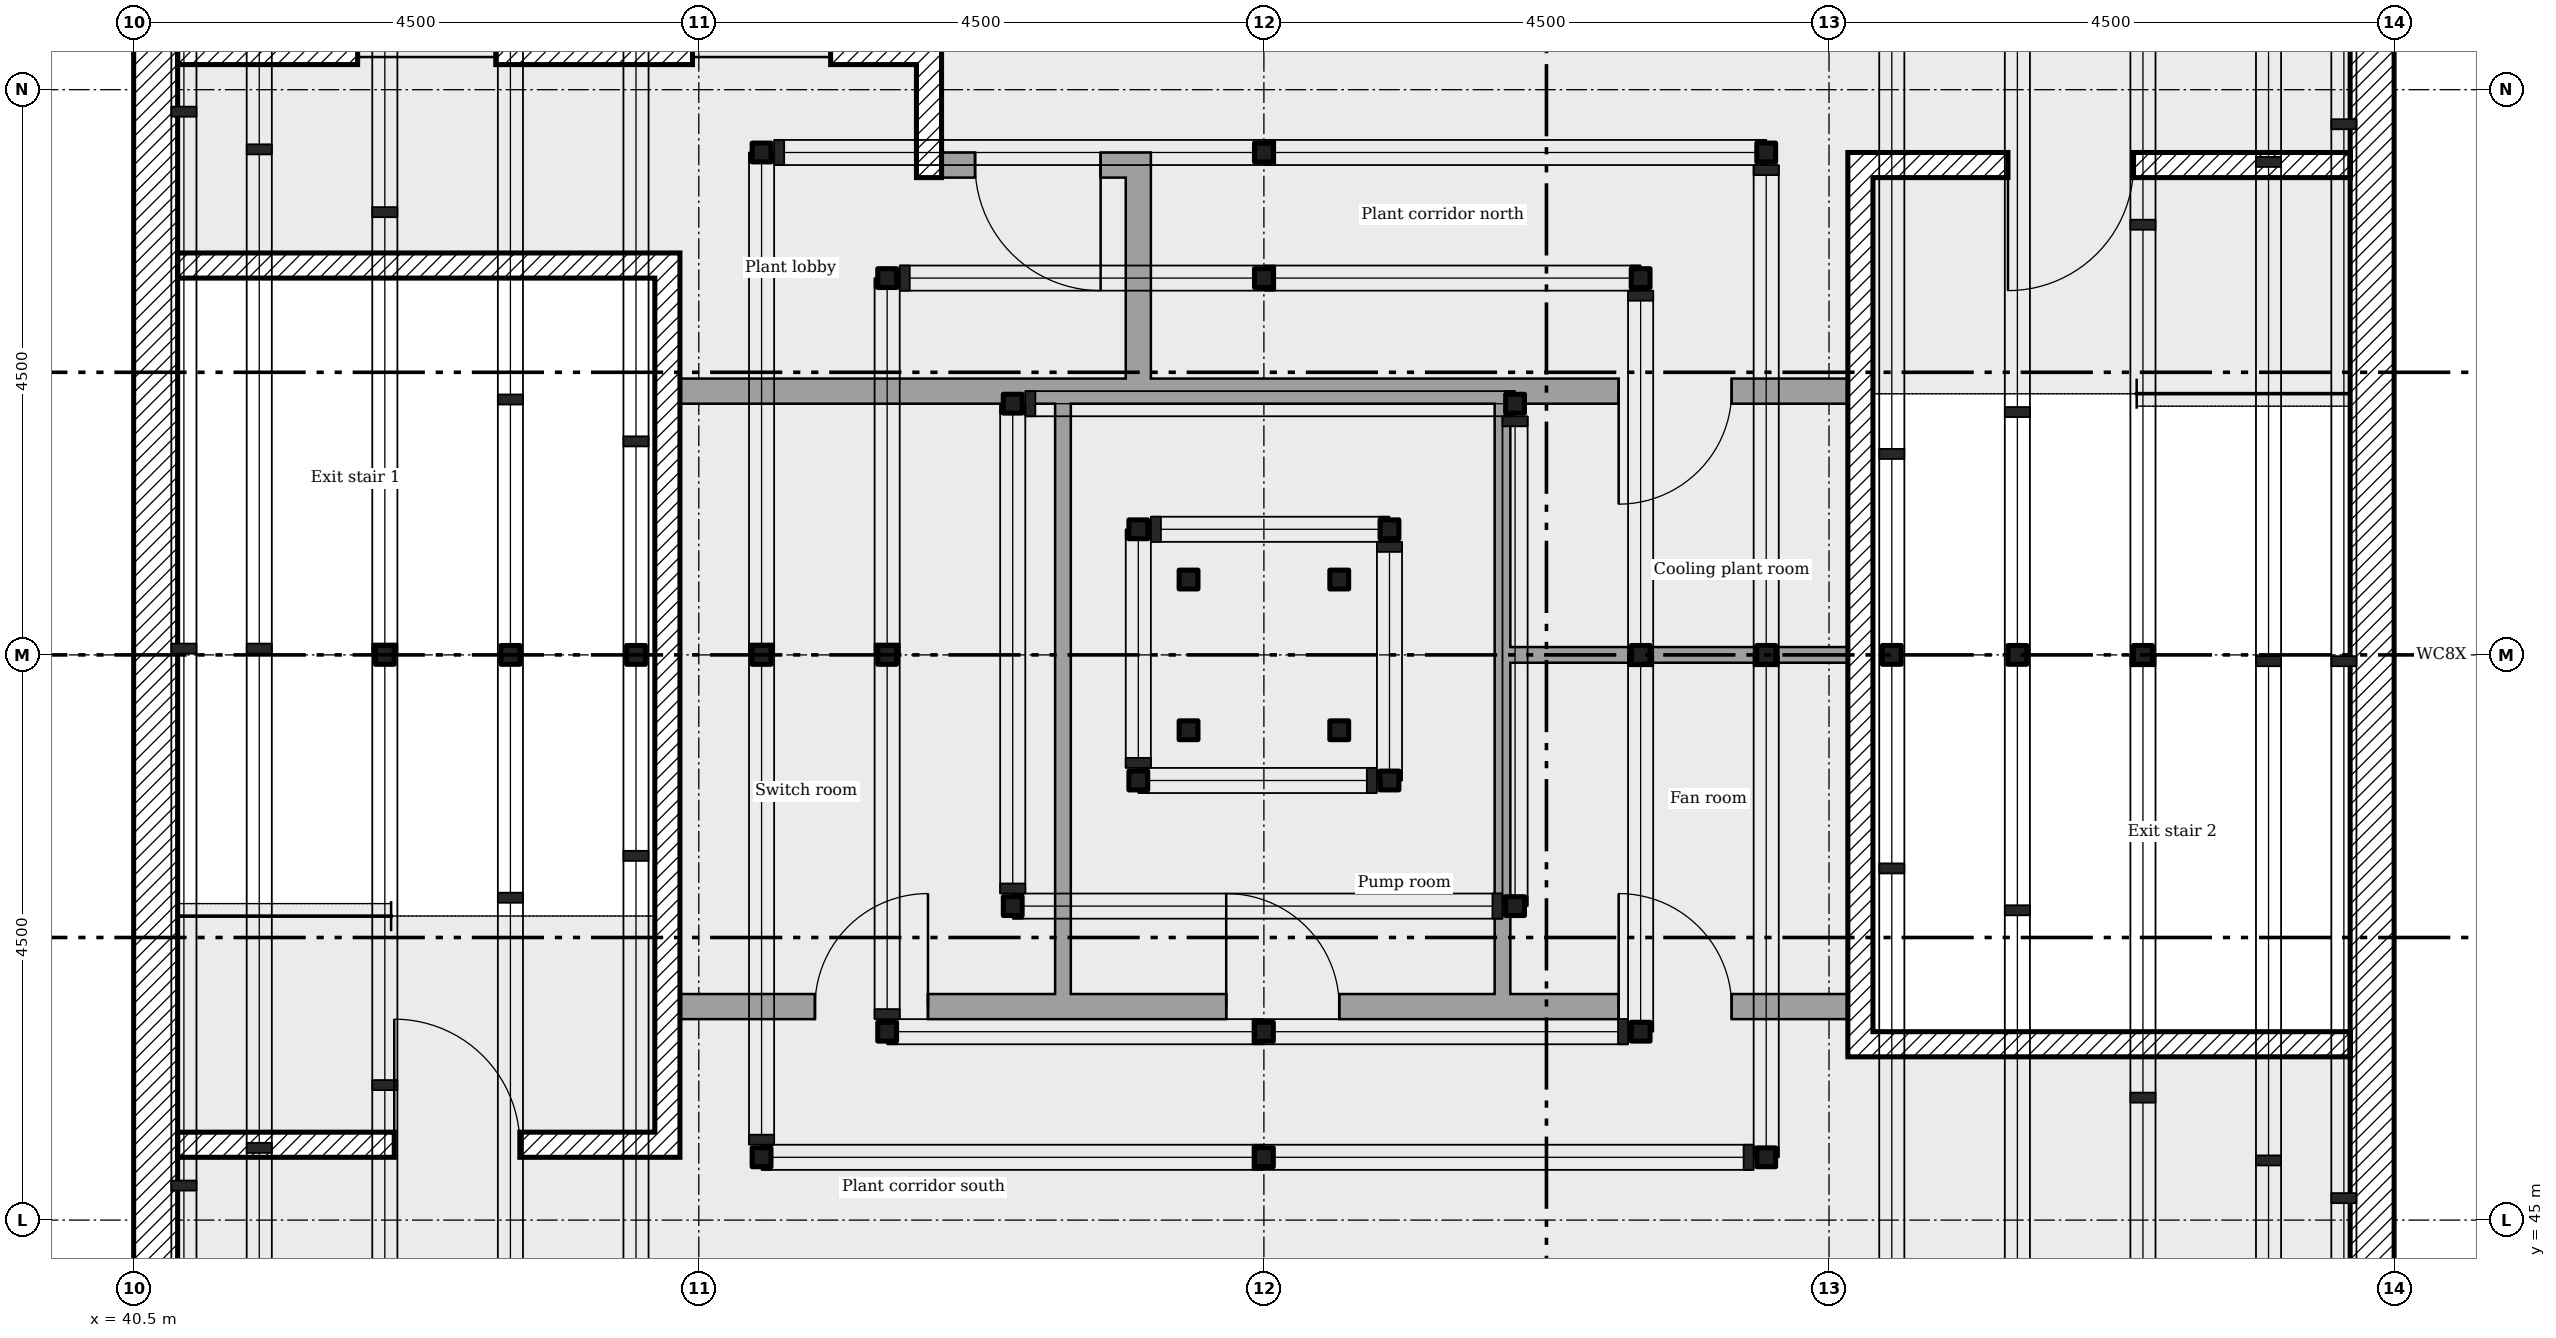
"""IFC4 building model, lengths in metres.
Left out: names, types, materials, properties, quantities, classifications, styles, units other than length and angle.
Written with IfcOpenShell. Run it as: python <this file> out.ifc"""

import sys

from ifc_helpers import new_model, si_unit, direction, frame, frame_2d, origin, origin_2d, place, context, subcontext, project, spatial, rectangle, hollow_rectangle, extrude, element, fill, save


model = new_model("IFC4")
c1 = context("Model", 3, precision=1e-05, world=origin(), true_north=direction((0.0, 1.0)))
c2 = subcontext(c1, "Body", "Model", "MODEL_VIEW")
j1 = project(units=[si_unit("LENGTHUNIT", "METRE"), si_unit("PLANEANGLEUNIT", "RADIAN")], contexts=[c1])
p1 = place(None, origin())
s1 = spatial("IfcSite", under=j1, at=p1, CompositionType="ELEMENT")
p2 = place(p1, origin())
s2 = spatial("IfcBuilding", under=s1, at=p2, CompositionType="ELEMENT")
p3 = place(p2, frame((0.0, 0.0, 279.1)))
s3 = spatial("IfcBuildingStorey", under=s2, at=p3, CompositionType="ELEMENT", Elevation=279.1)
p4 = place(p3, frame((58.375, 40.75, 4.5), z_axis=(0.0, 0.0, 1.0), x_axis=(0.0, 1.0, 0.0)))
e1 = element("IfcWall", 1, at=p4, inside=s3, PredefinedType="PARAPET", context=c2, shape_type="SweptSolid", body=[
    extrude(rectangle(XDim=17.75, YDim=0.25, at=frame_2d((8.875, 0.0))), origin(), (0.0, 0.0, 1.0), 1.1),
])
p5 = place(p3, frame((40.625, 58.25, 4.5), z_axis=(0.0, 0.0, 1.0), x_axis=(0.0, -1.0, 0.0)))
e2 = element("IfcWall", 2, at=p5, inside=s3, PredefinedType="PARAPET", context=c2, shape_type="SweptSolid", body=[
    extrude(rectangle(XDim=17.5, YDim=0.25, at=frame_2d((8.75, 0.0))), origin(), (0.0, 0.0, 1.0), 1.1),
])
for number, where in (
    (3, (56.5, 49.5, 4.5)),
    (4, (42.5, 49.5, 4.5)),
):
    element("IfcColumn", number, at=place(p3, frame(where)), inside=s3, PredefinedType="COLUMN", context=c2, shape_type="SweptSolid", body=[
        extrude(hollow_rectangle(XDim=0.15, YDim=0.15, WallThickness=0.008, at=origin_2d()), origin(), (0.0, 0.0, 1.0), 1.8),
    ])
for number, where in (
    (5, (55.5, 49.5, 4.5)),
    (6, (43.5, 49.5, 4.5)),
):
    element("IfcColumn", number, at=place(p3, frame(where)), inside=s3, PredefinedType="COLUMN", context=c2, shape_type="SweptSolid", body=[
        extrude(hollow_rectangle(XDim=0.15, YDim=0.15, WallThickness=0.008, at=origin_2d()), origin(), (0.0, 0.0, 1.0), 3.95),
    ])
for number, where in (
    (7, (54.5, 49.5, 4.5)),
    (8, (44.5, 49.5, 4.5)),
):
    element("IfcColumn", number, at=place(p3, frame(where)), inside=s3, PredefinedType="COLUMN", context=c2, shape_type="SweptSolid", body=[
        extrude(hollow_rectangle(XDim=0.15, YDim=0.15, WallThickness=0.008, at=origin_2d()), origin(), (0.0, 0.0, 1.0), 6.1),
    ])
for number, where in (
    (9, (45.5, 45.5, 4.5)),
    (10, (49.5, 45.5, 4.5)),
    (11, (53.5, 45.5, 4.5)),
    (12, (53.5, 49.5, 4.5)),
    (13, (53.5, 53.5, 4.5)),
    (14, (49.5, 53.5, 4.5)),
    (15, (45.5, 53.5, 4.5)),
    (16, (45.5, 49.5, 4.5)),
):
    element("IfcColumn", number, at=place(p3, frame(where)), inside=s3, PredefinedType="COLUMN", context=c2, shape_type="SweptSolid", body=[
        extrude(hollow_rectangle(XDim=0.15, YDim=0.15, WallThickness=0.008, at=origin_2d()), origin(), (0.0, 0.0, 1.0), 8.29),
    ])
for number, where in (
    (17, (46.5, 46.5, 4.5)),
    (18, (49.5, 46.5, 4.5)),
    (19, (52.5, 46.5, 4.5)),
    (20, (52.5, 49.5, 4.5)),
    (21, (52.5, 52.5, 4.5)),
    (22, (49.5, 52.5, 4.5)),
    (23, (46.5, 52.5, 4.5)),
    (24, (46.5, 49.5, 4.5)),
):
    element("IfcColumn", number, at=place(p3, frame(where)), inside=s3, PredefinedType="COLUMN", context=c2, shape_type="SweptSolid", body=[
        extrude(hollow_rectangle(XDim=0.15, YDim=0.15, WallThickness=0.008, at=origin_2d()), origin(), (0.0, 0.0, 1.0), 10.48),
    ])
for number, where in (
    (25, (47.5, 47.5, 4.5)),
    (26, (51.5, 47.5, 4.5)),
    (27, (51.5, 51.5, 4.5)),
    (28, (47.5, 51.5, 4.5)),
):
    element("IfcColumn", number, at=place(p3, frame(where)), inside=s3, PredefinedType="COLUMN", context=c2, shape_type="SweptSolid", body=[
        extrude(hollow_rectangle(XDim=0.15, YDim=0.15, WallThickness=0.008, at=origin_2d()), origin(), (0.0, 0.0, 1.0), 12.59),
    ])
for number, where in (
    (29, (48.5, 48.5, 4.5)),
    (30, (50.5, 48.5, 4.5)),
    (31, (50.5, 50.5, 4.5)),
    (32, (48.5, 50.5, 4.5)),
):
    element("IfcColumn", number, at=place(p3, frame(where)), inside=s3, PredefinedType="COLUMN", context=c2, shape_type="SweptSolid", body=[
        extrude(hollow_rectangle(XDim=0.15, YDim=0.15, WallThickness=0.008, at=origin_2d()), origin(), (0.0, 0.0, 1.0), 14.78),
    ])
for number, where in (
    (33, (48.9, 48.9, 4.5)),
    (34, (50.1, 48.9, 4.5)),
    (35, (50.1, 50.1, 4.5)),
    (36, (48.9, 50.1, 4.5)),
):
    element("IfcColumn", number, at=place(p3, frame(where)), inside=s3, PredefinedType="COLUMN", context=c2, shape_type="SweptSolid", body=[
        extrude(hollow_rectangle(XDim=0.15, YDim=0.15, WallThickness=0.008, at=origin_2d()), origin(), (0.0, 0.0, 1.0), 16.93),
    ])
p6 = place(p3, frame((58.325, 40.5, 0.0), z_axis=(0.0, 0.0, 1.0), x_axis=(0.0, 1.0, 0.0)))
e37 = element("IfcWall", 37, at=p6, inside=s3, PredefinedType="SHEAR", context=c2, shape_type="SweptSolid", body=[
    extrude(rectangle(XDim=18.0, YDim=0.35, at=frame_2d((9.0, 0.0))), origin(), (0.0, 0.0, 1.0), 3.3),
])
p7 = place(p3, frame((40.675, 40.85, 0.0), z_axis=(0.0, 0.0, 1.0), x_axis=(0.0, 1.0, 0.0)))
e38 = element("IfcWall", 38, at=p7, inside=s3, PredefinedType="SHEAR", context=c2, shape_type="SweptSolid", body=[
    extrude(rectangle(XDim=17.3, YDim=0.35, at=frame_2d((8.65, 0.0))), origin(), (0.0, 0.0, 1.0), 3.3),
])
p8 = place(p3, frame((46.833, 58.15, 0.0), z_axis=(0.0, 0.0, 1.0), x_axis=(0.0, -1.0, 0.0)))
e39 = element("IfcWall", 39, at=p8, inside=s3, PredefinedType="SHEAR", context=c2, shape_type="SweptSolid", body=[
    extrude(rectangle(XDim=4.85, YDim=0.2, at=frame_2d((2.425, 0.0))), origin(), (0.0, 0.0, 1.0), 3.3),
])
p9 = place(p3, frame((48.5, 51.6, 0.0), z_axis=(0.0, 0.0, 1.0), x_axis=(0.0, 1.0, 0.0)))
e40 = element("IfcWall", 40, at=p9, inside=s3, PredefinedType="PARTITIONING", context=c2, shape_type="SweptSolid", body=[
    extrude(rectangle(XDim=1.9, YDim=0.2, at=frame_2d((0.95, 0.0))), origin(), (0.0, 0.0, 1.0), 3.3),
])
p10 = place(p3, frame((46.933, 53.4, 0.0)))
e41 = element("IfcWall", 41, at=p10, inside=s3, PredefinedType="PARTITIONING", context=c2, shape_type="SweptSolid", body=[
    extrude(rectangle(XDim=1.467, YDim=0.2, at=frame_2d((0.733, 0.0))), origin(), (0.0, 0.0, 1.0), 3.3),
])
p11 = place(p10, frame((0.267, 0.0, 0.0)))
e42 = element("IfcOpeningElement", 42, at=p11, cuts=e41, PredefinedType="OPENING", context=c2, shape_type="SweptSolid", body=[
    extrude(rectangle(XDim=1.0, YDim=2.1, at=frame_2d((0.5, 1.05))), frame((0.0, 0.11, 0.0), z_axis=(0.0, -1.0, 0.0), x_axis=(1.0, 0.0, 0.0)), (0.0, 0.0, 1.0), 0.22),
])
p12 = place(p3, frame((40.85, 54.3, 0.0)))
e43 = element("IfcWall", 43, at=p12, inside=s3, PredefinedType="SHEAR", context=c2, shape_type="SweptSolid", body=[
    extrude(rectangle(XDim=5.883, YDim=0.2, at=frame_2d((2.942, 0.0))), origin(), (0.0, 0.0, 1.0), 3.3),
])
p13 = place(p12, frame((1.433, 0.0, 0.0)))
e44 = element("IfcOpeningElement", 44, at=p13, cuts=e43, PredefinedType="OPENING", context=c2, shape_type="SweptSolid", body=[
    extrude(rectangle(XDim=1.1, YDim=2.1, at=frame_2d((0.55, 1.05))), frame((0.0, 0.11, 0.0), z_axis=(0.0, -1.0, 0.0), x_axis=(1.0, 0.0, 0.0)), (0.0, 0.0, 1.0), 0.22),
])
p14 = place(p12, frame((4.1, 0.0, 0.0)))
e45 = element("IfcOpeningElement", 45, at=p14, cuts=e43, PredefinedType="OPENING", context=c2, shape_type="SweptSolid", body=[
    extrude(rectangle(XDim=1.1, YDim=2.1, at=frame_2d((0.55, 1.05))), frame((0.0, 0.11, 0.0), z_axis=(0.0, -1.0, 0.0), x_axis=(1.0, 0.0, 0.0)), (0.0, 0.0, 1.0), 0.22),
])
p15 = place(p3, frame((44.75, 45.5, 0.0), z_axis=(0.0, 0.0, 1.0), x_axis=(0.0, 1.0, 0.0)))
e46 = element("IfcWall", 46, at=p15, inside=s3, PredefinedType="SHEAR", context=c2, shape_type="SweptSolid", body=[
    extrude(rectangle(XDim=7.2, YDim=0.2, at=frame_2d((3.6, 0.0))), origin(), (0.0, 0.0, 1.0), 3.3),
])
p16 = place(p3, frame((40.85, 52.6, 0.0)))
e47 = element("IfcWall", 47, at=p16, inside=s3, PredefinedType="SHEAR", context=c2, shape_type="SweptSolid", body=[
    extrude(rectangle(XDim=3.8, YDim=0.2, at=frame_2d((1.9, 0.0))), origin(), (0.0, 0.0, 1.0), 3.3),
])
p17 = place(p3, frame((40.85, 45.6, 0.0)))
e48 = element("IfcWall", 48, at=p17, inside=s3, PredefinedType="SHEAR", context=c2, shape_type="SweptSolid", body=[
    extrude(rectangle(XDim=3.8, YDim=0.2, at=frame_2d((1.9, 0.0))), origin(), (0.0, 0.0, 1.0), 3.3),
])
p18 = place(p17, frame((1.725, 0.0, 0.0)))
e49 = element("IfcOpeningElement", 49, at=p18, cuts=e48, PredefinedType="OPENING", context=c2, shape_type="SweptSolid", body=[
    extrude(rectangle(XDim=1.0, YDim=2.1, at=frame_2d((0.5, 1.05))), frame((0.0, 0.11, 0.0), z_axis=(0.0, -1.0, 0.0), x_axis=(1.0, 0.0, 0.0)), (0.0, 0.0, 1.0), 0.22),
])
p19 = place(p3, frame((54.15, 53.4, 0.0)))
e50 = element("IfcWall", 50, at=p19, inside=s3, PredefinedType="SHEAR", context=c2, shape_type="SweptSolid", body=[
    extrude(rectangle(XDim=4.0, YDim=0.2, at=frame_2d((2.0, 0.0))), origin(), (0.0, 0.0, 1.0), 3.3),
])
p20 = place(p19, frame((1.275, 0.0, 0.0)))
e51 = element("IfcOpeningElement", 51, at=p20, cuts=e50, PredefinedType="OPENING", context=c2, shape_type="SweptSolid", body=[
    extrude(rectangle(XDim=1.0, YDim=2.1, at=frame_2d((0.5, 1.05))), frame((0.0, 0.11, 0.0), z_axis=(0.0, -1.0, 0.0), x_axis=(1.0, 0.0, 0.0)), (0.0, 0.0, 1.0), 0.22),
])
p21 = place(p3, frame((54.15, 46.4, 0.0)))
e52 = element("IfcWall", 52, at=p21, inside=s3, PredefinedType="SHEAR", context=c2, shape_type="SweptSolid", body=[
    extrude(rectangle(XDim=4.0, YDim=0.2, at=frame_2d((2.0, 0.0))), origin(), (0.0, 0.0, 1.0), 3.3),
])
p22 = place(p3, frame((54.25, 46.5, 0.0), z_axis=(0.0, 0.0, 1.0), x_axis=(0.0, 1.0, 0.0)))
e53 = element("IfcWall", 53, at=p22, inside=s3, PredefinedType="SHEAR", context=c2, shape_type="SweptSolid", body=[
    extrude(rectangle(XDim=6.8, YDim=0.2, at=frame_2d((3.4, 0.0))), origin(), (0.0, 0.0, 1.0), 3.3),
])
p23 = place(p3, frame((44.85, 51.6, 0.0)))
e54 = element("IfcWall", 54, at=p23, inside=s3, PredefinedType="PARTITIONING", context=c2, shape_type="SweptSolid", body=[
    extrude(rectangle(XDim=9.3, YDim=0.2, at=frame_2d((4.65, 0.0))), origin(), (0.0, 0.0, 1.0), 3.3),
])
p24 = place(p23, frame((7.475, 0.0, 0.0)))
e55 = element("IfcOpeningElement", 55, at=p24, cuts=e54, PredefinedType="OPENING", context=c2, shape_type="SweptSolid", body=[
    extrude(rectangle(XDim=0.9, YDim=2.1, at=frame_2d((0.45, 1.05))), frame((0.0, 0.11, 0.0), z_axis=(0.0, -1.0, 0.0), x_axis=(1.0, 0.0, 0.0)), (0.0, 0.0, 1.0), 0.22),
])
p25 = place(p3, frame((44.85, 46.7, 0.0)))
e56 = element("IfcWall", 56, at=p25, inside=s3, PredefinedType="PARTITIONING", context=c2, shape_type="SweptSolid", body=[
    extrude(rectangle(XDim=9.3, YDim=0.2, at=frame_2d((4.65, 0.0))), origin(), (0.0, 0.0, 1.0), 3.3),
])
p26 = place(p25, frame((1.075, 0.0, 0.0)))
e57 = element("IfcOpeningElement", 57, at=p26, cuts=e56, PredefinedType="OPENING", context=c2, shape_type="SweptSolid", body=[
    extrude(rectangle(XDim=0.9, YDim=2.1, at=frame_2d((0.45, 1.05))), frame((0.0, 0.11, 0.0), z_axis=(0.0, -1.0, 0.0), x_axis=(1.0, 0.0, 0.0)), (0.0, 0.0, 1.0), 0.22),
])
p27 = place(p25, frame((4.35, 0.0, 0.0)))
e58 = element("IfcOpeningElement", 58, at=p27, cuts=e56, PredefinedType="OPENING", context=c2, shape_type="SweptSolid", body=[
    extrude(rectangle(XDim=0.9, YDim=2.1, at=frame_2d((0.45, 1.05))), frame((0.0, 0.11, 0.0), z_axis=(0.0, -1.0, 0.0), x_axis=(1.0, 0.0, 0.0)), (0.0, 0.0, 1.0), 0.22),
])
p28 = place(p25, frame((7.475, 0.0, 0.0)))
e59 = element("IfcOpeningElement", 59, at=p28, cuts=e56, PredefinedType="OPENING", context=c2, shape_type="SweptSolid", body=[
    extrude(rectangle(XDim=0.9, YDim=2.1, at=frame_2d((0.45, 1.05))), frame((0.0, 0.11, 0.0), z_axis=(0.0, -1.0, 0.0), x_axis=(1.0, 0.0, 0.0)), (0.0, 0.0, 1.0), 0.22),
])
p29 = place(p3, frame((47.9, 46.8, 0.0), z_axis=(0.0, 0.0, 1.0), x_axis=(0.0, 1.0, 0.0)))
e60 = element("IfcWall", 60, at=p29, inside=s3, PredefinedType="PARTITIONING", context=c2, shape_type="SweptSolid", body=[
    extrude(rectangle(XDim=4.7, YDim=0.125, at=frame_2d((2.35, 0.0))), origin(), (0.0, 0.0, 1.0), 3.3),
])
p30 = place(p3, frame((51.4, 46.8, 0.0), z_axis=(0.0, 0.0, 1.0), x_axis=(0.0, 1.0, 0.0)))
e61 = element("IfcWall", 61, at=p30, inside=s3, PredefinedType="PARTITIONING", context=c2, shape_type="SweptSolid", body=[
    extrude(rectangle(XDim=2.762, YDim=0.125, at=frame_2d((1.381, 0.0))), origin(), (0.0, 0.0, 1.0), 3.3),
])
p31 = place(p3, frame((54.15, 49.5, 0.0), z_axis=(0.0, 0.0, 1.0), x_axis=(-1.0, 0.0, 0.0)))
e62 = element("IfcWall", 62, at=p31, inside=s3, PredefinedType="PARTITIONING", context=c2, shape_type="SweptSolid", body=[
    extrude(rectangle(XDim=2.688, YDim=0.125, at=frame_2d((1.344, 0.0))), origin(), (0.0, 0.0, 1.0), 3.3),
])
p32 = place(p3, frame((51.4, 49.5, 0.0), z_axis=(0.0, 0.0, 1.0), x_axis=(0.0, 1.0, 0.0)))
e63 = element("IfcWall", 63, at=p32, inside=s3, PredefinedType="PARTITIONING", context=c2, shape_type="SweptSolid", body=[
    extrude(rectangle(XDim=2.0, YDim=0.125, at=frame_2d((1.0, 0.0))), origin(), (0.0, 0.0, 1.0), 3.3),
])
p33 = place(p18, origin())
e64 = element("IfcDoor", 64, at=p33, inside=s3, OperationType="SINGLE_SWING_RIGHT", PredefinedType="DOOR", context=c2, shape_type="SweptSolid", body=[
    extrude(rectangle(XDim=1.0, YDim=2.1, at=frame_2d((0.5, 1.05))), frame((0.0, 0.025, 0.0), z_axis=(0.0, -1.0, 0.0), x_axis=(1.0, 0.0, 0.0)), (0.0, 0.0, 1.0), 0.05),
])
fill(e49, e64)
p34 = place(p20, frame((1.0, 0.0, 0.0), x_axis=(-1.0, 0.0, 0.0)))
e65 = element("IfcDoor", 65, at=p34, inside=s3, OperationType="SINGLE_SWING_LEFT", PredefinedType="DOOR", context=c2, shape_type="SweptSolid", body=[
    extrude(rectangle(XDim=1.0, YDim=2.1, at=frame_2d((0.5, 1.05))), frame((0.0, 0.025, 0.0), z_axis=(0.0, -1.0, 0.0), x_axis=(1.0, 0.0, 0.0)), (0.0, 0.0, 1.0), 0.05),
])
fill(e51, e65)
p35 = place(p11, frame((1.0, 0.0, 0.0), x_axis=(-1.0, 0.0, 0.0)))
e66 = element("IfcDoor", 66, at=p35, inside=s3, OperationType="SINGLE_SWING_RIGHT", PredefinedType="DOOR", context=c2, shape_type="SweptSolid", body=[
    extrude(rectangle(XDim=1.0, YDim=2.1, at=frame_2d((0.5, 1.05))), frame((0.0, 0.025, 0.0), z_axis=(0.0, -1.0, 0.0), x_axis=(1.0, 0.0, 0.0)), (0.0, 0.0, 1.0), 0.05),
])
fill(e42, e66)
p36 = place(p26, origin())
e67 = element("IfcDoor", 67, at=p36, inside=s3, OperationType="SINGLE_SWING_LEFT", PredefinedType="DOOR", context=c2, shape_type="SweptSolid", body=[
    extrude(rectangle(XDim=0.9, YDim=2.1, at=frame_2d((0.45, 1.05))), frame((0.0, 0.025, 0.0), z_axis=(0.0, -1.0, 0.0), x_axis=(1.0, 0.0, 0.0)), (0.0, 0.0, 1.0), 0.05),
])
fill(e57, e67)
p37 = place(p27, origin())
e68 = element("IfcDoor", 68, at=p37, inside=s3, OperationType="SINGLE_SWING_RIGHT", PredefinedType="DOOR", context=c2, shape_type="SweptSolid", body=[
    extrude(rectangle(XDim=0.9, YDim=2.1, at=frame_2d((0.45, 1.05))), frame((0.0, 0.025, 0.0), z_axis=(0.0, -1.0, 0.0), x_axis=(1.0, 0.0, 0.0)), (0.0, 0.0, 1.0), 0.05),
])
fill(e58, e68)
p38 = place(p28, origin())
e69 = element("IfcDoor", 69, at=p38, inside=s3, OperationType="SINGLE_SWING_RIGHT", PredefinedType="DOOR", context=c2, shape_type="SweptSolid", body=[
    extrude(rectangle(XDim=0.9, YDim=2.1, at=frame_2d((0.45, 1.05))), frame((0.0, 0.025, 0.0), z_axis=(0.0, -1.0, 0.0), x_axis=(1.0, 0.0, 0.0)), (0.0, 0.0, 1.0), 0.05),
])
fill(e59, e69)
p39 = place(p24, frame((0.9, 0.0, 0.0), x_axis=(-1.0, 0.0, 0.0)))
e70 = element("IfcDoor", 70, at=p39, inside=s3, OperationType="SINGLE_SWING_LEFT", PredefinedType="DOOR", context=c2, shape_type="SweptSolid", body=[
    extrude(rectangle(XDim=0.9, YDim=2.1, at=frame_2d((0.45, 1.05))), frame((0.0, 0.025, 0.0), z_axis=(0.0, -1.0, 0.0), x_axis=(1.0, 0.0, 0.0)), (0.0, 0.0, 1.0), 0.05),
])
fill(e55, e70)
p40 = place(p13, origin())
e71 = element("IfcDoor", 71, at=p40, inside=s3, OperationType="SLIDING_TO_LEFT", PredefinedType="DOOR", context=c2, shape_type="SweptSolid", body=[
    extrude(rectangle(XDim=1.1, YDim=2.1, at=frame_2d((0.55, 1.05))), frame((0.0, 0.025, 0.0), z_axis=(0.0, -1.0, 0.0), x_axis=(1.0, 0.0, 0.0)), (0.0, 0.0, 1.0), 0.05),
])
fill(e44, e71)
p41 = place(p14, origin())
e72 = element("IfcDoor", 72, at=p41, inside=s3, OperationType="SLIDING_TO_LEFT", PredefinedType="DOOR", context=c2, shape_type="SweptSolid", body=[
    extrude(rectangle(XDim=1.1, YDim=2.1, at=frame_2d((0.55, 1.05))), frame((0.0, 0.025, 0.0), z_axis=(0.0, -1.0, 0.0), x_axis=(1.0, 0.0, 0.0)), (0.0, 0.0, 1.0), 0.05),
])
fill(e45, e72)
save(model, sys.argv[1])
